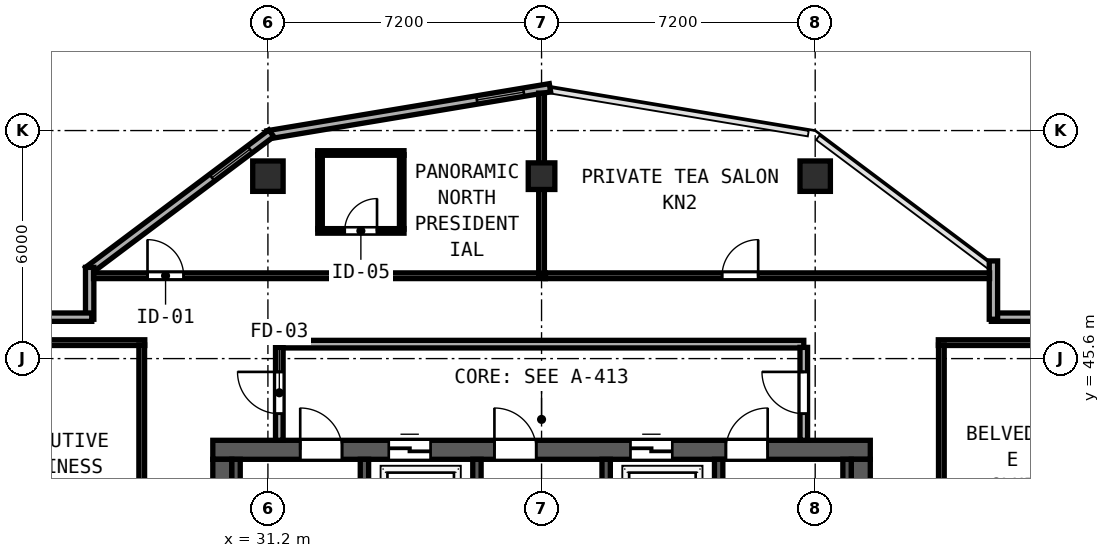
"""IFC4 building model, lengths in metres.
Left out: names, types, materials, properties, quantities, classifications, styles, units other than length and angle.
Written with IfcOpenShell. Run it as: python <this file> out.ifc"""

import sys

from ifc_helpers import new_model, si_unit, direction, frame, frame_2d, origin, origin_2d, place, context, subcontext, project, spatial, rectangle, hollow_rectangle, extrude, element, fill, save


model = new_model("IFC4")
c1 = context("Model", 3, precision=1e-05, world=origin(), true_north=direction((0.0, 1.0)))
c2 = subcontext(c1, "Body", "Model", "MODEL_VIEW")
j1 = project(units=[si_unit("LENGTHUNIT", "METRE"), si_unit("PLANEANGLEUNIT", "RADIAN")], contexts=[c1])
p1 = place(None, origin())
s1 = spatial("IfcSite", under=j1, at=p1, CompositionType="ELEMENT")
p2 = place(p1, origin())
s2 = spatial("IfcBuilding", under=s1, at=p2, CompositionType="ELEMENT")
p3 = place(p2, frame((0.0, 0.0, 239.05)))
s3 = spatial("IfcBuildingStorey", under=s2, at=p3, CompositionType="ELEMENT", Elevation=239.05)
p4 = place(p3, frame((29.75, 43.2, 0.0), z_axis=(0.0, 0.0, 1.0), x_axis=(1.0, 0.0, 0.0)))
e1 = element("IfcWall", 1, at=p4, inside=s3, PredefinedType="SHEAR", context=c2, shape_type="SweptSolid", body=[
    extrude(rectangle(XDim=17.3, YDim=0.5, at=frame_2d((8.65, 0.0))), origin(), (0.0, 0.0, 1.0), 3.67),
])
p5 = place(p4, frame((2.3, 0.0, 0.0)))
e2 = element("IfcOpeningElement", 2, at=p5, cuts=e1, PredefinedType="OPENING", context=c2, shape_type="SweptSolid", body=[
    extrude(rectangle(XDim=1.1, YDim=2.15, at=frame_2d((0.55, 1.075))), frame((0.0, 0.26, 0.0), z_axis=(0.0, -1.0, 0.0), x_axis=(1.0, 0.0, 0.0)), (0.0, 0.0, 1.0), 0.52),
])
p6 = place(p4, frame((7.41, 0.0, 0.0)))
e3 = element("IfcOpeningElement", 3, at=p6, cuts=e1, PredefinedType="OPENING", context=c2, shape_type="SweptSolid", body=[
    extrude(rectangle(XDim=1.1, YDim=2.15, at=frame_2d((0.55, 1.075))), frame((0.0, 0.26, 0.0), z_axis=(0.0, -1.0, 0.0), x_axis=(1.0, 0.0, 0.0)), (0.0, 0.0, 1.0), 0.52),
])
p7 = place(p4, frame((13.5, 0.0, 0.0)))
e4 = element("IfcOpeningElement", 4, at=p7, cuts=e1, PredefinedType="OPENING", context=c2, shape_type="SweptSolid", body=[
    extrude(rectangle(XDim=1.1, YDim=2.15, at=frame_2d((0.55, 1.075))), frame((0.0, 0.26, 0.0), z_axis=(0.0, -1.0, 0.0), x_axis=(1.0, 0.0, 0.0)), (0.0, 0.0, 1.0), 0.52),
])
p8 = place(p4, frame((4.63, 0.0, 0.0)))
e5 = element("IfcOpeningElement", 5, at=p8, cuts=e1, PredefinedType="OPENING", context=c2, shape_type="SweptSolid", body=[
    extrude(rectangle(XDim=1.1, YDim=2.2, at=frame_2d((0.55, 1.1))), frame((0.0, 0.26, 0.0), z_axis=(0.0, -1.0, 0.0), x_axis=(1.0, 0.0, 0.0)), (0.0, 0.0, 1.0), 0.52),
])
p9 = place(p4, frame((10.99, 0.0, 0.0)))
e6 = element("IfcOpeningElement", 6, at=p9, cuts=e1, PredefinedType="OPENING", context=c2, shape_type="SweptSolid", body=[
    extrude(rectangle(XDim=1.1, YDim=2.2, at=frame_2d((0.55, 1.1))), frame((0.0, 0.26, 0.0), z_axis=(0.0, -1.0, 0.0), x_axis=(1.0, 0.0, 0.0)), (0.0, 0.0, 1.0), 0.52),
])
for number, where, z_axis, x_axis in (
    (7, (30.0, 32.8, 0.0), (0.0, 0.0, 1.0), (0.0, 1.0, 0.0)),
    (8, (46.8, 32.8, 0.0), (0.0, 0.0, 1.0), (0.0, 1.0, 0.0)),
):
    element("IfcWall", number, at=place(p3, frame(where, z_axis=z_axis, x_axis=x_axis)), inside=s3, PredefinedType="SHEAR", context=c2, shape_type="SweptSolid", body=[
        extrude(rectangle(XDim=10.15, YDim=0.5, at=frame_2d((5.075, 0.0))), origin(), (0.0, 0.0, 1.0), 3.67),
    ])
for number, where, z_axis, x_axis in (
    (9, (30.362, 35.39, 0.0), (0.0, 0.0, 1.0), (0.0, 1.0, 0.0)),
    (10, (33.74, 35.39, 0.0), (0.0, 0.0, 1.0), (0.0, 1.0, 0.0)),
    (11, (36.7, 35.39, 0.0), (0.0, 0.0, 1.0), (0.0, 1.0, 0.0)),
    (12, (40.1, 35.39, 0.0), (0.0, 0.0, 1.0), (0.0, 1.0, 0.0)),
    (13, (43.06, 35.39, 0.0), (0.0, 0.0, 1.0), (0.0, 1.0, 0.0)),
    (14, (46.438, 35.39, 0.0), (0.0, 0.0, 1.0), (0.0, 1.0, 0.0)),
):
    element("IfcWall", number, at=place(p3, frame(where, z_axis=z_axis, x_axis=x_axis)), inside=s3, PredefinedType="SHEAR", context=c2, shape_type="SweptSolid", body=[
        extrude(rectangle(XDim=7.56, YDim=0.22, at=frame_2d((3.78, 0.0))), origin(), (0.0, 0.0, 1.0), 3.67),
    ])
for number, where, z_axis, x_axis in (
    (15, (31.2, 50.4, 0.0), (0.0, 0.0, 1.0), (1.0, 0.0, 0.0)),
    (16, (45.6, 50.4, 0.0), (0.0, 0.0, 1.0), (1.0, 0.0, 0.0)),
):
    element("IfcColumn", number, at=place(p3, frame(where, z_axis=z_axis, x_axis=x_axis)), inside=s3, PredefinedType="COLUMN", context=c2, shape_type="SweptSolid", body=[
        extrude(hollow_rectangle(XDim=0.8, YDim=0.8, WallThickness=0.03, at=origin_2d()), origin(), (0.0, 0.0, 1.0), 3.85),
    ])
p10 = place(p3, frame((38.4, 50.4, 0.0), z_axis=(0.0, 0.0, 1.0), x_axis=(1.0, 0.0, 0.0)))
e17 = element("IfcColumn", 17, at=p10, inside=s3, PredefinedType="COLUMN", context=c2, shape_type="SweptSolid", body=[
    extrude(hollow_rectangle(XDim=0.7, YDim=0.7, WallThickness=0.026, at=origin_2d()), origin(), (0.0, 0.0, 1.0), 3.85),
])
p11 = place(p3, frame((51.545, 46.69, 0.0), z_axis=(0.0, 0.0, 1.0), x_axis=(-1.0, 0.0, 0.0)))
e18 = element("IfcWall", 18, at=p11, inside=s3, PredefinedType="SOLIDWALL", context=c2, shape_type="SweptSolid", body=[
    extrude(rectangle(XDim=1.31, YDim=0.22, at=frame_2d((0.655, 0.0))), origin(), (0.0, 0.0, 1.0), 3.67),
])
p12 = place(p3, frame((50.29, 46.635, 0.0), z_axis=(0.0, 0.0, 1.0), x_axis=(0.0, 1.0, 0.0)))
e19 = element("IfcWall", 19, at=p12, inside=s3, PredefinedType="SOLIDWALL", context=c2, shape_type="SweptSolid", body=[
    extrude(rectangle(XDim=1.535, YDim=0.22, at=frame_2d((0.768, 0.0))), origin(), (0.0, 0.0, 1.0), 3.67),
])
p13 = place(p3, frame((38.622, 52.726, 0.0), z_axis=(0.0, 0.0, 1.0), x_axis=(-0.986390420428, -0.164420006349, 0.0)))
e20 = element("IfcWall", 20, at=p13, inside=s3, PredefinedType="SOLIDWALL", context=c2, shape_type="SweptSolid", body=[
    extrude(rectangle(XDim=7.534, YDim=0.22, at=frame_2d((3.767, 0.0))), origin(), (0.0, 0.0, 1.0), 3.67),
])
p14 = place(p13, frame((0.7, 0.0, 0.85)))
e21 = element("IfcOpeningElement", 21, at=p14, cuts=e20, PredefinedType="OPENING", context=c2, shape_type="SweptSolid", body=[
    extrude(rectangle(XDim=1.25, YDim=1.95, at=frame_2d((0.625, 0.975))), frame((0.0, 0.12, 0.0), z_axis=(0.0, -1.0, 0.0), x_axis=(1.0, 0.0, 0.0)), (0.0, 0.0, 1.0), 0.24),
])
p15 = place(p3, frame((31.289, 51.529, 0.0), z_axis=(0.0, 0.0, 1.0), x_axis=(-0.800014580093, -0.599980559383, 0.0)))
e22 = element("IfcWall", 22, at=p15, inside=s3, PredefinedType="SOLIDWALL", context=c2, shape_type="SweptSolid", body=[
    extrude(rectangle(XDim=6.028, YDim=0.22, at=frame_2d((3.014, 0.0))), origin(), (0.0, 0.0, 1.0), 3.67),
])
p16 = place(p15, frame((0.7, 0.0, 0.85)))
e23 = element("IfcOpeningElement", 23, at=p16, cuts=e22, PredefinedType="OPENING", context=c2, shape_type="SweptSolid", body=[
    extrude(rectangle(XDim=1.25, YDim=1.95, at=frame_2d((0.625, 0.975))), frame((0.0, 0.12, 0.0), z_axis=(0.0, -1.0, 0.0), x_axis=(1.0, 0.0, 0.0)), (0.0, 0.0, 1.0), 0.24),
])
p17 = place(p3, frame((26.51, 48.0, 0.0), z_axis=(0.0, 0.0, 1.0), x_axis=(0.0, -1.0, 0.0)))
e24 = element("IfcWall", 24, at=p17, inside=s3, PredefinedType="SOLIDWALL", context=c2, shape_type="SweptSolid", body=[
    extrude(rectangle(XDim=1.365, YDim=0.22, at=frame_2d((0.683, 0.0))), origin(), (0.0, 0.0, 1.0), 3.67),
])
p18 = place(p3, frame((26.565, 46.69, 0.0), z_axis=(0.0, 0.0, 1.0), x_axis=(-1.0, 0.0, 0.0)))
e25 = element("IfcWall", 25, at=p18, inside=s3, PredefinedType="SOLIDWALL", context=c2, shape_type="SweptSolid", body=[
    extrude(rectangle(XDim=1.31, YDim=0.22, at=frame_2d((0.655, 0.0))), origin(), (0.0, 0.0, 1.0), 3.67),
])
p19 = place(p3, frame((31.5, 45.98, 0.0), z_axis=(0.0, 0.0, 1.0), x_axis=(1.0, 0.0, 0.0)))
e26 = element("IfcWall", 26, at=p19, inside=s3, PredefinedType="SOLIDWALL", context=c2, shape_type="SweptSolid", body=[
    extrude(rectangle(XDim=13.8, YDim=0.2, at=frame_2d((6.9, 0.0))), origin(), (0.0, 0.0, 1.0), 3.67),
])
p20 = place(p3, frame((31.5, 43.45, 0.0), z_axis=(0.0, 0.0, 1.0), x_axis=(0.0, 1.0, 0.0)))
e27 = element("IfcWall", 27, at=p20, inside=s3, PredefinedType="SOLIDWALL", context=c2, shape_type="SweptSolid", body=[
    extrude(rectangle(XDim=2.445, YDim=0.2, at=frame_2d((1.223, 0.0))), origin(), (0.0, 0.0, 1.0), 3.67),
])
p21 = place(p20, frame((1.8, 0.0, 0.0), z_axis=(0.0, 0.0, 1.0), x_axis=(-1.0, 0.0, 0.0)))
e28 = element("IfcOpeningElement", 28, at=p21, cuts=e27, PredefinedType="OPENING", context=c2, shape_type="SweptSolid", body=[
    extrude(rectangle(XDim=1.1, YDim=2.15, at=frame_2d((0.55, 1.075))), frame((0.0, 0.11, 0.0), z_axis=(0.0, -1.0, 0.0), x_axis=(1.0, 0.0, 0.0)), (0.0, 0.0, 1.0), 0.22),
])
p22 = place(p3, frame((45.3, 43.45, 0.0), z_axis=(0.0, 0.0, 1.0), x_axis=(0.0, 1.0, 0.0)))
e29 = element("IfcWall", 29, at=p22, inside=s3, PredefinedType="SOLIDWALL", context=c2, shape_type="SweptSolid", body=[
    extrude(rectangle(XDim=2.445, YDim=0.2, at=frame_2d((1.223, 0.0))), origin(), (0.0, 0.0, 1.0), 3.67),
])
p23 = place(p22, frame((0.7, 0.0, 0.0)))
e30 = element("IfcOpeningElement", 30, at=p23, cuts=e29, PredefinedType="OPENING", context=c2, shape_type="SweptSolid", body=[
    extrude(rectangle(XDim=1.1, YDim=2.15, at=frame_2d((0.55, 1.075))), frame((0.0, 0.11, 0.0), z_axis=(0.0, -1.0, 0.0), x_axis=(1.0, 0.0, 0.0)), (0.0, 0.0, 1.0), 0.22),
])
p24 = place(p3, frame((25.412, 46.02, 0.0), z_axis=(0.0, 0.0, 1.0), x_axis=(1.0, 0.0, 0.0)))
e31 = element("IfcWall", 31, at=p24, inside=s3, PredefinedType="PARTITIONING", context=c2, shape_type="SweptSolid", body=[
    extrude(rectangle(XDim=2.548, YDim=0.15, at=frame_2d((1.274, 0.0))), origin(), (0.0, 0.0, 1.0), 3.67),
])
p25 = place(p3, frame((27.88, 38.42, 0.0), z_axis=(0.0, 0.0, 1.0), x_axis=(0.0, 1.0, 0.0)))
e32 = element("IfcWall", 32, at=p25, inside=s3, PredefinedType="PARTITIONING", context=c2, shape_type="SweptSolid", body=[
    extrude(rectangle(XDim=7.54, YDim=0.15, at=frame_2d((3.77, 0.0))), origin(), (0.0, 0.0, 1.0), 3.67),
])
p26 = place(p25, frame((3.01, 0.0, 0.0), z_axis=(0.0, 0.0, 1.0), x_axis=(-1.0, 0.0, 0.0)))
e33 = element("IfcOpeningElement", 33, at=p26, cuts=e32, PredefinedType="OPENING", context=c2, shape_type="SweptSolid", body=[
    extrude(rectangle(XDim=0.95, YDim=2.12, at=frame_2d((0.475, 1.06))), frame((0.0, 0.085, 0.0), z_axis=(0.0, -1.0, 0.0), x_axis=(1.0, 0.0, 0.0)), (0.0, 0.0, 1.0), 0.17),
])
p27 = place(p3, frame((48.84, 46.02, 0.0), z_axis=(0.0, 0.0, 1.0), x_axis=(1.0, 0.0, 0.0)))
e34 = element("IfcWall", 34, at=p27, inside=s3, PredefinedType="PARTITIONING", context=c2, shape_type="SweptSolid", body=[
    extrude(rectangle(XDim=2.548, YDim=0.15, at=frame_2d((1.274, 0.0))), origin(), (0.0, 0.0, 1.0), 3.67),
])
p28 = place(p3, frame((48.92, 36.62, 0.0), z_axis=(0.0, 0.0, 1.0), x_axis=(0.0, 1.0, 0.0)))
e35 = element("IfcWall", 35, at=p28, inside=s3, PredefinedType="PARTITIONING", context=c2, shape_type="SweptSolid", body=[
    extrude(rectangle(XDim=9.34, YDim=0.15, at=frame_2d((4.67, 0.0))), origin(), (0.0, 0.0, 1.0), 3.67),
])
p29 = place(p28, frame((3.06, 0.0, 0.0)))
e36 = element("IfcOpeningElement", 36, at=p29, cuts=e35, PredefinedType="OPENING", context=c2, shape_type="SweptSolid", body=[
    extrude(rectangle(XDim=0.95, YDim=2.12, at=frame_2d((0.475, 1.06))), frame((0.0, 0.085, 0.0), z_axis=(0.0, -1.0, 0.0), x_axis=(1.0, 0.0, 0.0)), (0.0, 0.0, 1.0), 0.17),
])
p30 = place(p3, frame((26.612, 47.78, 0.0), z_axis=(0.0, 0.0, 1.0), x_axis=(1.0, 0.0, 0.0)))
e37 = element("IfcWall", 37, at=p30, inside=s3, PredefinedType="PARTITIONING", context=c2, shape_type="SweptSolid", body=[
    extrude(rectangle(XDim=11.888, YDim=0.15, at=frame_2d((5.944, 0.0))), origin(), (0.0, 0.0, 1.0), 3.67),
])
p31 = place(p30, frame((1.42, 0.0, 0.0)))
e38 = element("IfcOpeningElement", 38, at=p31, cuts=e37, PredefinedType="OPENING", context=c2, shape_type="SweptSolid", body=[
    extrude(rectangle(XDim=0.95, YDim=2.18, at=frame_2d((0.475, 1.09))), frame((0.0, 0.085, 0.0), z_axis=(0.0, -1.0, 0.0), x_axis=(1.0, 0.0, 0.0)), (0.0, 0.0, 1.0), 0.17),
])
p32 = place(p3, frame((38.4, 47.84, 0.0), z_axis=(0.0, 0.0, 1.0), x_axis=(0.0, 1.0, 0.0)))
e39 = element("IfcWall", 39, at=p32, inside=s3, PredefinedType="PARTITIONING", context=c2, shape_type="SweptSolid", body=[
    extrude(rectangle(XDim=4.745, YDim=0.15, at=frame_2d((2.373, 0.0))), origin(), (0.0, 0.0, 1.0), 3.67),
])
p33 = place(p3, frame((32.511, 51.01, 0.0), z_axis=(0.0, 0.0, 1.0), x_axis=(1.0, 0.0, 0.0)))
e40 = element("IfcWall", 40, at=p33, inside=s3, PredefinedType="PARTITIONING", context=c2, shape_type="SweptSolid", body=[
    extrude(rectangle(XDim=2.27, YDim=0.12, at=frame_2d((1.135, 0.0))), origin(), (0.0, 0.0, 1.0), 3.67),
])
p34 = place(p3, frame((32.511, 48.96, 0.0), z_axis=(0.0, 0.0, 1.0), x_axis=(1.0, 0.0, 0.0)))
e41 = element("IfcWall", 41, at=p34, inside=s3, PredefinedType="PARTITIONING", context=c2, shape_type="SweptSolid", body=[
    extrude(rectangle(XDim=2.27, YDim=0.12, at=frame_2d((1.135, 0.0))), origin(), (0.0, 0.0, 1.0), 3.67),
])
p35 = place(p34, frame((0.71, 0.0, 0.0)))
e42 = element("IfcOpeningElement", 42, at=p35, cuts=e41, PredefinedType="OPENING", context=c2, shape_type="SweptSolid", body=[
    extrude(rectangle(XDim=0.85, YDim=2.1, at=frame_2d((0.425, 1.05))), frame((0.0, 0.07, 0.0), z_axis=(0.0, -1.0, 0.0), x_axis=(1.0, 0.0, 0.0)), (0.0, 0.0, 1.0), 0.14),
])
for number, where, z_axis, x_axis in (
    (43, (32.571, 49.005, 0.0), (0.0, 0.0, 1.0), (0.0, 1.0, 0.0)),
    (44, (34.721, 49.005, 0.0), (0.0, 0.0, 1.0), (0.0, 1.0, 0.0)),
):
    element("IfcWall", number, at=place(p3, frame(where, z_axis=z_axis, x_axis=x_axis)), inside=s3, PredefinedType="PARTITIONING", context=c2, shape_type="SweptSolid", body=[
        extrude(rectangle(XDim=1.96, YDim=0.12, at=frame_2d((0.98, 0.0))), origin(), (0.0, 0.0, 1.0), 3.67),
    ])
p36 = place(p3, frame((38.502, 47.78, 0.0), z_axis=(0.0, 0.0, 1.0), x_axis=(1.0, 0.0, 0.0)))
e45 = element("IfcWall", 45, at=p36, inside=s3, PredefinedType="PARTITIONING", context=c2, shape_type="SweptSolid", body=[
    extrude(rectangle(XDim=11.686, YDim=0.15, at=frame_2d((5.843, 0.0))), origin(), (0.0, 0.0, 1.0), 3.67),
])
p37 = place(p36, frame((4.648, 0.0, 0.0)))
e46 = element("IfcOpeningElement", 46, at=p37, cuts=e45, PredefinedType="OPENING", context=c2, shape_type="SweptSolid", body=[
    extrude(rectangle(XDim=0.95, YDim=2.12, at=frame_2d((0.475, 1.06))), frame((0.0, 0.085, 0.0), z_axis=(0.0, -1.0, 0.0), x_axis=(1.0, 0.0, 0.0)), (0.0, 0.0, 1.0), 0.17),
])
p38 = place(p14, origin())
e47 = element("IfcWindow", 47, at=p38, inside=s3, PartitioningType="SINGLE_PANEL", PredefinedType="WINDOW", context=c2, shape_type="SweptSolid", body=[
    extrude(rectangle(XDim=1.25, YDim=1.95, at=frame_2d((0.625, 0.975))), frame((0.0, 0.03, 0.0), z_axis=(0.0, -1.0, 0.0), x_axis=(1.0, 0.0, 0.0)), (0.0, 0.0, 1.0), 0.06),
])
fill(e21, e47)
p39 = place(p16, origin())
e48 = element("IfcWindow", 48, at=p39, inside=s3, PartitioningType="SINGLE_PANEL", PredefinedType="WINDOW", context=c2, shape_type="SweptSolid", body=[
    extrude(rectangle(XDim=1.25, YDim=1.95, at=frame_2d((0.625, 0.975))), frame((0.0, 0.03, 0.0), z_axis=(0.0, -1.0, 0.0), x_axis=(1.0, 0.0, 0.0)), (0.0, 0.0, 1.0), 0.06),
])
fill(e23, e48)
p40 = place(p5, origin())
e49 = element("IfcDoor", 49, at=p40, inside=s3, OperationType="SINGLE_SWING_LEFT", PredefinedType="DOOR", context=c2, shape_type="SweptSolid", body=[
    extrude(rectangle(XDim=1.1, YDim=2.15, at=frame_2d((0.55, 1.075))), frame((0.0, 0.185, 0.0), z_axis=(0.0, -1.0, 0.0), x_axis=(1.0, 0.0, 0.0)), (0.0, 0.0, 1.0), 0.05),
])
fill(e2, e49)
p41 = place(p6, origin())
e50 = element("IfcDoor", 50, at=p41, inside=s3, OperationType="SINGLE_SWING_LEFT", PredefinedType="DOOR", context=c2, shape_type="SweptSolid", body=[
    extrude(rectangle(XDim=1.1, YDim=2.15, at=frame_2d((0.55, 1.075))), frame((0.0, 0.185, 0.0), z_axis=(0.0, -1.0, 0.0), x_axis=(1.0, 0.0, 0.0)), (0.0, 0.0, 1.0), 0.05),
])
fill(e3, e50)
p42 = place(p7, origin())
e51 = element("IfcDoor", 51, at=p42, inside=s3, OperationType="SINGLE_SWING_RIGHT", PredefinedType="DOOR", context=c2, shape_type="SweptSolid", body=[
    extrude(rectangle(XDim=1.1, YDim=2.15, at=frame_2d((0.55, 1.075))), frame((0.0, 0.185, 0.0), z_axis=(0.0, -1.0, 0.0), x_axis=(1.0, 0.0, 0.0)), (0.0, 0.0, 1.0), 0.05),
])
fill(e4, e51)
p43 = place(p21, origin())
e52 = element("IfcDoor", 52, at=p43, inside=s3, OperationType="SINGLE_SWING_LEFT", PredefinedType="DOOR", context=c2, shape_type="SweptSolid", body=[
    extrude(rectangle(XDim=1.1, YDim=2.15, at=frame_2d((0.55, 1.075))), frame((0.0, 0.025, 0.0), z_axis=(0.0, -1.0, 0.0), x_axis=(1.0, 0.0, 0.0)), (0.0, 0.0, 1.0), 0.05),
])
fill(e28, e52)
p44 = place(p23, origin())
e53 = element("IfcDoor", 53, at=p44, inside=s3, OperationType="SINGLE_SWING_RIGHT", PredefinedType="DOOR", context=c2, shape_type="SweptSolid", body=[
    extrude(rectangle(XDim=1.1, YDim=2.15, at=frame_2d((0.55, 1.075))), frame((0.0, 0.025, 0.0), z_axis=(0.0, -1.0, 0.0), x_axis=(1.0, 0.0, 0.0)), (0.0, 0.0, 1.0), 0.05),
])
fill(e30, e53)
p45 = place(p8, origin())
e54 = element("IfcDoor", 54, at=p45, inside=s3, OperationType="SLIDING_TO_LEFT", PredefinedType="DOOR", context=c2, shape_type="SweptSolid", body=[
    extrude(rectangle(XDim=1.1, YDim=2.2, at=frame_2d((0.55, 1.1))), frame((0.0, 0.185, 0.0), z_axis=(0.0, -1.0, 0.0), x_axis=(1.0, 0.0, 0.0)), (0.0, 0.0, 1.0), 0.05),
])
fill(e5, e54)
p46 = place(p9, origin())
e55 = element("IfcDoor", 55, at=p46, inside=s3, OperationType="SLIDING_TO_LEFT", PredefinedType="DOOR", context=c2, shape_type="SweptSolid", body=[
    extrude(rectangle(XDim=1.1, YDim=2.2, at=frame_2d((0.55, 1.1))), frame((0.0, 0.185, 0.0), z_axis=(0.0, -1.0, 0.0), x_axis=(1.0, 0.0, 0.0)), (0.0, 0.0, 1.0), 0.05),
])
fill(e6, e55)
p47 = place(p31, origin())
e56 = element("IfcDoor", 56, at=p47, inside=s3, OperationType="SINGLE_SWING_LEFT", PredefinedType="DOOR", context=c2, shape_type="SweptSolid", body=[
    extrude(rectangle(XDim=0.95, YDim=2.18, at=frame_2d((0.475, 1.09))), frame((0.0, 0.025, 0.0), z_axis=(0.0, -1.0, 0.0), x_axis=(1.0, 0.0, 0.0)), (0.0, 0.0, 1.0), 0.05),
])
fill(e38, e56)
p48 = place(p35, origin())
e57 = element("IfcDoor", 57, at=p48, inside=s3, OperationType="SINGLE_SWING_RIGHT", PredefinedType="DOOR", context=c2, shape_type="SweptSolid", body=[
    extrude(rectangle(XDim=0.85, YDim=2.1, at=frame_2d((0.425, 1.05))), frame((0.0, 0.025, 0.0), z_axis=(0.0, -1.0, 0.0), x_axis=(1.0, 0.0, 0.0)), (0.0, 0.0, 1.0), 0.05),
])
fill(e42, e57)
p49 = place(p37, origin())
e58 = element("IfcDoor", 58, at=p49, inside=s3, OperationType="SINGLE_SWING_RIGHT", PredefinedType="DOOR", context=c2, shape_type="SweptSolid", body=[
    extrude(rectangle(XDim=0.95, YDim=2.12, at=frame_2d((0.475, 1.06))), frame((0.0, 0.025, 0.0), z_axis=(0.0, -1.0, 0.0), x_axis=(1.0, 0.0, 0.0)), (0.0, 0.0, 1.0), 0.05),
])
fill(e46, e58)
save(model, sys.argv[1])
